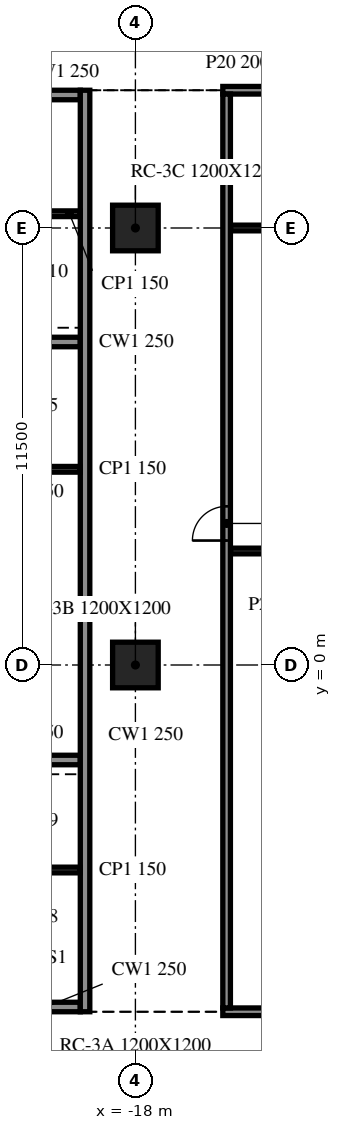
"""IFC4 building model, lengths in metres.
Left out: names, types, materials, properties, quantities, classifications, styles, units other than length and angle.
Written with IfcOpenShell. Run it as: python <this file> out.ifc"""

import sys

from ifc_helpers import new_model, si_unit, direction, frame, frame_2d, origin, origin_2d, place, context, subcontext, project, spatial, rectangle, extrude, element, fill, save


model = new_model("IFC4")
c1 = context("Model", 3, precision=1e-05, world=origin(), true_north=direction((0.0, 1.0)))
c2 = subcontext(c1, "Body", "Model", "MODEL_VIEW")
j1 = project(units=[si_unit("LENGTHUNIT", "METRE"), si_unit("PLANEANGLEUNIT", "RADIAN")], contexts=[c1])
p1 = place(None, origin())
s1 = spatial("IfcSite", under=j1, at=p1, CompositionType="ELEMENT")
p2 = place(p1, origin())
s2 = spatial("IfcBuilding", under=s1, at=p2, CompositionType="ELEMENT")
p3 = place(p2, frame((0.0, 0.0, 170.6)))
s3 = spatial("IfcBuildingStorey", under=s2, at=p3, CompositionType="ELEMENT", Elevation=170.6)
for number, where, z_axis, x_axis in (
    (1, (-18.0, 0.0, -0.34), (0.0, 0.0, 1.0), (1.0, 0.0, 0.0)),
    (2, (-18.0, 11.5, -0.34), (0.0, 0.0, 1.0), (1.0, 0.0, 0.0)),
):
    element("IfcColumn", number, at=place(p3, frame(where, z_axis=z_axis, x_axis=x_axis)), inside=s3, PredefinedType="COLUMN", context=c2, shape_type="SweptSolid", body=[
        extrude(rectangle(XDim=1.2, YDim=1.2, at=origin_2d()), origin(), (0.0, 0.0, 1.0), 3.8),
    ])
p4 = place(p3, frame((-19.325, -9.125, 0.0), z_axis=(0.0, 0.0, 1.0), x_axis=(0.0, 1.0, 0.0)))
e3 = element("IfcWall", 3, at=p4, inside=s3, PredefinedType="SOLIDWALL", context=c2, shape_type="SweptSolid", body=[
    extrude(rectangle(XDim=24.25, YDim=0.25, at=frame_2d((12.125, 0.0))), origin(), (0.0, 0.0, 1.0), 3.46),
])
p5 = place(p3, frame((-19.45, -9.0, 0.0), z_axis=(0.0, 0.0, 1.0), x_axis=(-1.0, 0.0, 0.0)))
e4 = element("IfcWall", 4, at=p5, inside=s3, PredefinedType="SOLIDWALL", context=c2, shape_type="SweptSolid", body=[
    extrude(rectangle(XDim=9.1, YDim=0.25, at=frame_2d((4.55, 0.0))), origin(), (0.0, 0.0, 1.0), 3.46),
])
p6 = place(p5, frame((3.65, 0.0, 0.0)))
e5 = element("IfcOpeningElement", 5, at=p6, cuts=e4, PredefinedType="OPENING", context=c2, shape_type="SweptSolid", body=[
    extrude(rectangle(XDim=1.8, YDim=2.1, at=frame_2d((0.9, 1.05))), frame((0.0, 0.135, 0.0), z_axis=(0.0, -1.0, 0.0), x_axis=(1.0, 0.0, 0.0)), (0.0, 0.0, 1.0), 0.27),
])
p7 = place(p3, frame((-28.55, 15.0, 0.0), z_axis=(0.0, 0.0, 1.0), x_axis=(1.0, 0.0, 0.0)))
e6 = element("IfcWall", 6, at=p7, inside=s3, PredefinedType="SOLIDWALL", context=c2, shape_type="SweptSolid", body=[
    extrude(rectangle(XDim=9.1, YDim=0.25, at=frame_2d((4.55, 0.0))), origin(), (0.0, 0.0, 1.0), 3.46),
])
p8 = place(p7, frame((3.65, 0.0, 0.0)))
e7 = element("IfcOpeningElement", 7, at=p8, cuts=e6, PredefinedType="OPENING", context=c2, shape_type="SweptSolid", body=[
    extrude(rectangle(XDim=1.8, YDim=2.1, at=frame_2d((0.9, 1.05))), frame((0.0, 0.135, 0.0), z_axis=(0.0, -1.0, 0.0), x_axis=(1.0, 0.0, 0.0)), (0.0, 0.0, 1.0), 0.27),
])
for number, where, z_axis, x_axis in (
    (8, (-22.3, -2.5, 0.0), (0.0, 0.0, 1.0), (1.0, 0.0, 0.0)),
    (9, (-22.3, 8.5, 0.0), (0.0, 0.0, 1.0), (1.0, 0.0, 0.0)),
):
    element("IfcWall", number, at=place(p3, frame(where, z_axis=z_axis, x_axis=x_axis)), inside=s3, PredefinedType="SOLIDWALL", context=c2, shape_type="SweptSolid", body=[
        extrude(rectangle(XDim=2.85, YDim=0.25, at=frame_2d((1.425, 0.0))), origin(), (0.0, 0.0, 1.0), 3.46),
    ])
for number, where, z_axis, x_axis in (
    (10, (-22.3, 5.15, 0.0), (0.0, 0.0, 1.0), (1.0, 0.0, 0.0)),
    (11, (-22.3, -5.395, 0.0), (0.0, 0.0, 1.0), (1.0, 0.0, 0.0)),
    (12, (-22.3, 11.875, 0.0), (0.0, 0.0, 1.0), (1.0, 0.0, 0.0)),
):
    element("IfcWall", number, at=place(p3, frame(where, z_axis=z_axis, x_axis=x_axis)), inside=s3, PredefinedType="PARTITIONING", context=c2, shape_type="SweptSolid", body=[
        extrude(rectangle(XDim=2.85, YDim=0.15, at=frame_2d((1.425, 0.0))), origin(), (0.0, 0.0, 1.0), 3.46),
    ])
p9 = place(p3, frame((-15.7, -9.125, 0.0), z_axis=(0.0, 0.0, 1.0), x_axis=(1.0, 0.0, 0.0)))
e13 = element("IfcWall", 13, at=p9, inside=s3, PredefinedType="PARTITIONING", context=c2, shape_type="SweptSolid", body=[
    extrude(rectangle(XDim=7.3, YDim=0.2, at=frame_2d((3.65, 0.0))), origin(), (0.0, 0.0, 1.0), 3.46),
])
p10 = place(p9, frame((3.1, 0.0, 0.0)))
e14 = element("IfcOpeningElement", 14, at=p10, cuts=e13, PredefinedType="OPENING", context=c2, shape_type="SweptSolid", body=[
    extrude(rectangle(XDim=0.9, YDim=2.1, at=frame_2d((0.45, 1.05))), frame((0.0, 0.11, 0.0), z_axis=(0.0, -1.0, 0.0), x_axis=(1.0, 0.0, 0.0)), (0.0, 0.0, 1.0), 0.22),
])
for number, where, z_axis, x_axis in (
    (15, (-15.5, 3.0, 0.0), (0.0, 0.0, 1.0), (1.0, 0.0, 0.0)),
    (16, (-15.5, 11.5, 0.0), (0.0, 0.0, 1.0), (1.0, 0.0, 0.0)),
):
    element("IfcWall", number, at=place(p3, frame(where, z_axis=z_axis, x_axis=x_axis)), inside=s3, PredefinedType="PARTITIONING", context=c2, shape_type="SweptSolid", body=[
        extrude(rectangle(XDim=6.9, YDim=0.15, at=frame_2d((3.45, 0.0))), origin(), (0.0, 0.0, 1.0), 3.46),
    ])
p11 = place(p3, frame((-15.7, 15.125, 0.0), z_axis=(0.0, 0.0, 1.0), x_axis=(1.0, 0.0, 0.0)))
e17 = element("IfcWall", 17, at=p11, inside=s3, PredefinedType="PARTITIONING", context=c2, shape_type="SweptSolid", body=[
    extrude(rectangle(XDim=7.3, YDim=0.2, at=frame_2d((3.65, 0.0))), origin(), (0.0, 0.0, 1.0), 3.46),
])
p12 = place(p11, frame((3.1, 0.0, 0.0)))
e18 = element("IfcOpeningElement", 18, at=p12, cuts=e17, PredefinedType="OPENING", context=c2, shape_type="SweptSolid", body=[
    extrude(rectangle(XDim=0.9, YDim=2.1, at=frame_2d((0.45, 1.05))), frame((0.0, 0.11, 0.0), z_axis=(0.0, -1.0, 0.0), x_axis=(1.0, 0.0, 0.0)), (0.0, 0.0, 1.0), 0.22),
])
p13 = place(p3, frame((-15.6, -9.025, 0.0), z_axis=(0.0, 0.0, 1.0), x_axis=(0.0, 1.0, 0.0)))
e19 = element("IfcWall", 19, at=p13, inside=s3, PredefinedType="PARTITIONING", context=c2, shape_type="SweptSolid", body=[
    extrude(rectangle(XDim=24.05, YDim=0.2, at=frame_2d((12.025, 0.0))), origin(), (0.0, 0.0, 1.0), 3.46),
])
p14 = place(p13, frame((12.3, 0.0, 0.0)))
e20 = element("IfcOpeningElement", 20, at=p14, cuts=e19, PredefinedType="OPENING", context=c2, shape_type="SweptSolid", body=[
    extrude(rectangle(XDim=0.9, YDim=2.1, at=frame_2d((0.45, 1.05))), frame((0.0, 0.11, 0.0), z_axis=(0.0, -1.0, 0.0), x_axis=(1.0, 0.0, 0.0)), (0.0, 0.0, 1.0), 0.22),
])
p15 = place(p14, origin())
e21 = element("IfcDoor", 21, at=p15, inside=s3, OperationType="SINGLE_SWING_LEFT", PredefinedType="DOOR", context=c2, shape_type="SweptSolid", body=[
    extrude(rectangle(XDim=0.9, YDim=2.1, at=frame_2d((0.45, 1.05))), frame((0.0, 0.025, 0.0), z_axis=(0.0, -1.0, 0.0), x_axis=(1.0, 0.0, 0.0)), (0.0, 0.0, 1.0), 0.05),
])
fill(e20, e21)
save(model, sys.argv[1])
